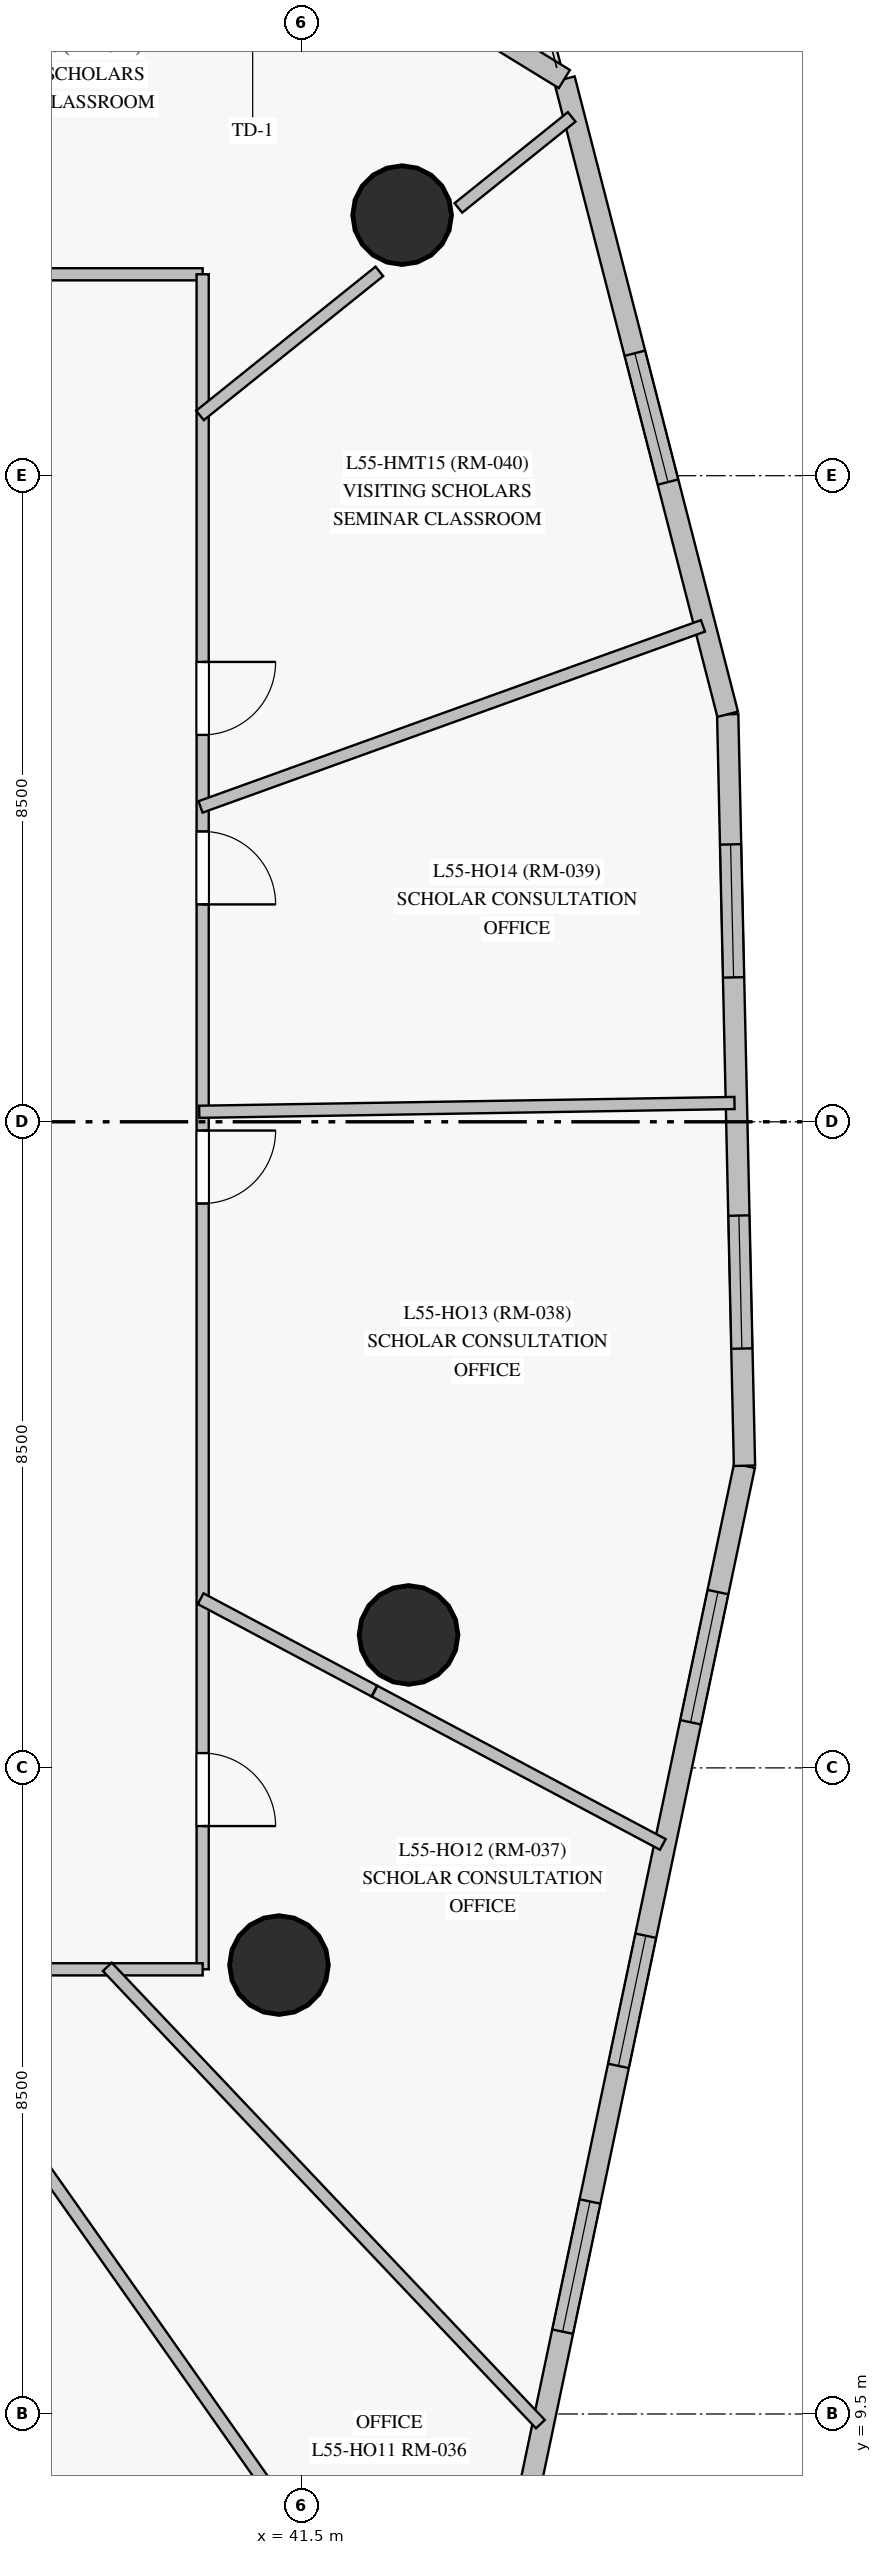
"""IFC4 building model, lengths in metres.
Left out: names, types, materials, properties, quantities, classifications, styles, units other than length and angle.
Written with IfcOpenShell. Run it as: python <this file> out.ifc"""

import sys

from ifc_helpers import new_model, si_unit, direction, frame, frame_2d, origin, origin_with_axes, origin_2d, place, context, subcontext, project, spatial, rectangle, circle, extrude, source, transform, mapped, element, fill, save


model = new_model("IFC4")
c1 = context("Model", 3, precision=1e-05, world=origin(), true_north=direction((0.0, 1.0)))
c2 = subcontext(c1, "Body", "Model", "MODEL_VIEW")
j1 = project(units=[si_unit("LENGTHUNIT", "METRE"), si_unit("PLANEANGLEUNIT", "RADIAN")], contexts=[c1])
p1 = place(None, origin())
s1 = spatial("IfcSite", under=j1, at=p1, CompositionType="ELEMENT")
p2 = place(p1, origin())
s2 = spatial("IfcBuilding", under=s1, at=p2, CompositionType="ELEMENT")
p3 = place(p2, frame((0.0, 0.0, 190.1)))
s3 = spatial("IfcBuildingStorey", under=s2, at=p3, CompositionType="ELEMENT", Elevation=190.1)
m1 = source(origin_with_axes(), c2, "Body", "SweptSolid", [
    extrude(circle(Radius=0.65, at=origin_2d()), origin(), (0.0, 0.0, 1.0), 3.05),
])
for number, where, z_axis, x_axis in (
    (1, (42.909, 19.749, 0.0), (0.0, 0.0, 1.0), (1.0, 0.0, 0.0)),
    (2, (42.824, 38.428, 0.0), (0.0, 0.0, 1.0), (1.0, 0.0, 0.0)),
    (3, (41.204, 15.406, 0.0), (0.0, 0.0, 1.0), (1.0, 0.0, 0.0)),
):
    element("IfcColumn", number, at=place(p3, frame(where, z_axis=z_axis, x_axis=x_axis)), inside=s3, PredefinedType="COLUMN", context=c2, shape_type="MappedRepresentation", body=[
        mapped(m1, transform((0.0, 0.0, 0.0), scale=1.0)),
    ])
p4 = place(p3, frame((44.391, 7.986, 0.0), z_axis=(0.0, 0.0, 1.0), x_axis=(0.205520669539, 0.978652775193, 0.0)))
e4 = element("IfcWall", 4, at=p4, inside=s3, PredefinedType="SOLIDWALL", context=c2, shape_type="SweptSolid", body=[
    extrude(rectangle(XDim=14.294, YDim=0.28, at=frame_2d((7.147, 0.0))), origin(), (0.0, 0.0, 1.0), 2.825),
])
p5 = place(p4, frame((2.654, 0.0, 0.85)))
e5 = element("IfcOpeningElement", 5, at=p5, cuts=e4, PredefinedType="OPENING", context=c2, shape_type="SweptSolid", body=[
    extrude(rectangle(XDim=1.75, YDim=1.65, at=frame_2d((0.875, 0.825))), frame((0.0, 0.15, 0.0), z_axis=(0.0, -1.0, 0.0), x_axis=(1.0, 0.0, 0.0)), (0.0, 0.0, 1.0), 0.3),
])
p6 = place(p4, frame((6.226, 0.0, 0.85)))
e6 = element("IfcOpeningElement", 6, at=p6, cuts=e4, PredefinedType="OPENING", context=c2, shape_type="SweptSolid", body=[
    extrude(rectangle(XDim=1.75, YDim=1.65, at=frame_2d((0.875, 0.825))), frame((0.0, 0.15, 0.0), z_axis=(0.0, -1.0, 0.0), x_axis=(1.0, 0.0, 0.0)), (0.0, 0.0, 1.0), 0.3),
])
p7 = place(p4, frame((10.846, 0.0, 0.85)))
e7 = element("IfcOpeningElement", 7, at=p7, cuts=e4, PredefinedType="OPENING", context=c2, shape_type="SweptSolid", body=[
    extrude(rectangle(XDim=1.75, YDim=1.65, at=frame_2d((0.875, 0.825))), frame((0.0, 0.15, 0.0), z_axis=(0.0, -1.0, 0.0), x_axis=(1.0, 0.0, 0.0)), (0.0, 0.0, 1.0), 0.3),
])
p8 = place(p3, frame((47.328, 21.975, 0.0), z_axis=(0.0, 0.0, 1.0), x_axis=(-0.022343410657, 0.999750354839, 0.0)))
e8 = element("IfcWall", 8, at=p8, inside=s3, PredefinedType="SOLIDWALL", context=c2, shape_type="SweptSolid", body=[
    extrude(rectangle(XDim=9.889, YDim=0.28, at=frame_2d((4.944, 0.0))), origin(), (0.0, 0.0, 1.0), 2.825),
])
p9 = place(p8, frame((1.542, 0.0, 0.85)))
e9 = element("IfcOpeningElement", 9, at=p9, cuts=e8, PredefinedType="OPENING", context=c2, shape_type="SweptSolid", body=[
    extrude(rectangle(XDim=1.75, YDim=1.65, at=frame_2d((0.875, 0.825))), frame((0.0, 0.15, 0.0), z_axis=(0.0, -1.0, 0.0), x_axis=(1.0, 0.0, 0.0)), (0.0, 0.0, 1.0), 0.3),
])
p10 = place(p8, frame((6.427, 0.0, 0.85)))
e10 = element("IfcOpeningElement", 10, at=p10, cuts=e8, PredefinedType="OPENING", context=c2, shape_type="SweptSolid", body=[
    extrude(rectangle(XDim=1.75, YDim=1.65, at=frame_2d((0.875, 0.825))), frame((0.0, 0.15, 0.0), z_axis=(0.0, -1.0, 0.0), x_axis=(1.0, 0.0, 0.0)), (0.0, 0.0, 1.0), 0.3),
])
p11 = place(p3, frame((47.107, 31.861, 0.0), z_axis=(0.0, 0.0, 1.0), x_axis=(-0.249041039811, 0.968492932597, 0.0)))
e11 = element("IfcWall", 11, at=p11, inside=s3, PredefinedType="SOLIDWALL", context=c2, shape_type="SweptSolid", body=[
    extrude(rectangle(XDim=8.629, YDim=0.28, at=frame_2d((4.314, 0.0))), origin(), (0.0, 0.0, 1.0), 2.825),
])
p12 = place(p11, frame((3.154, 0.0, 0.85)))
e12 = element("IfcOpeningElement", 12, at=p12, cuts=e11, PredefinedType="OPENING", context=c2, shape_type="SweptSolid", body=[
    extrude(rectangle(XDim=1.75, YDim=1.65, at=frame_2d((0.875, 0.825))), frame((0.0, 0.15, 0.0), z_axis=(0.0, -1.0, 0.0), x_axis=(1.0, 0.0, 0.0)), (0.0, 0.0, 1.0), 0.3),
])
p13 = place(p3, frame((44.958, 40.218, 0.0), z_axis=(0.0, 0.0, 1.0), x_axis=(-0.852257947878, 0.523121773853, 0.0)))
e13 = element("IfcWall", 13, at=p13, inside=s3, PredefinedType="SOLIDWALL", context=c2, shape_type="SweptSolid", body=[
    extrude(rectangle(XDim=19.246, YDim=0.28, at=frame_2d((9.623, 0.0))), origin(), (0.0, 0.0, 1.0), 2.495),
])
p14 = place(p13, frame((4.287, 0.0, 0.0)))
e14 = element("IfcOpeningElement", 14, at=p14, cuts=e13, PredefinedType="OPENING", context=c2, shape_type="SweptSolid", body=[
    extrude(rectangle(XDim=1.05, YDim=2.12, at=frame_2d((0.525, 1.06))), frame((0.0, 0.15, 0.0), z_axis=(0.0, -1.0, 0.0), x_axis=(1.0, 0.0, 0.0)), (0.0, 0.0, 1.0), 0.3),
])
p15 = place(p3, frame((16.7, 37.65, 0.0), z_axis=(0.0, 0.0, 1.0), x_axis=(1.0, 0.0, 0.0)))
e15 = element("IfcWall", 15, at=p15, inside=s3, PredefinedType="PARTITIONING", context=c2, shape_type="SweptSolid", body=[
    extrude(rectangle(XDim=23.5, YDim=0.16, at=frame_2d((11.75, 0.0))), origin(), (0.0, 0.0, 1.0), 2.375),
])
p16 = place(p15, frame((20.285, 0.0, 0.0)))
e16 = element("IfcOpeningElement", 16, at=p16, cuts=e15, PredefinedType="OPENING", context=c2, shape_type="SweptSolid", body=[
    extrude(rectangle(XDim=0.96, YDim=2.15, at=frame_2d((0.48, 1.075))), frame((0.0, 0.09, 0.0), z_axis=(0.0, -1.0, 0.0), x_axis=(1.0, 0.0, 0.0)), (0.0, 0.0, 1.0), 0.18),
])
p17 = place(p15, frame((16.66, 0.0, 0.0)))
e17 = element("IfcOpeningElement", 17, at=p17, cuts=e15, PredefinedType="OPENING", context=c2, shape_type="SweptSolid", body=[
    extrude(rectangle(XDim=0.96, YDim=2.15, at=frame_2d((0.48, 1.075))), frame((0.0, 0.09, 0.0), z_axis=(0.0, -1.0, 0.0), x_axis=(1.0, 0.0, 0.0)), (0.0, 0.0, 1.0), 0.18),
])
p18 = place(p15, frame((13.863, 0.0, 0.0)))
e18 = element("IfcOpeningElement", 18, at=p18, cuts=e15, PredefinedType="OPENING", context=c2, shape_type="SweptSolid", body=[
    extrude(rectangle(XDim=0.96, YDim=2.15, at=frame_2d((0.48, 1.075))), frame((0.0, 0.09, 0.0), z_axis=(0.0, -1.0, 0.0), x_axis=(1.0, 0.0, 0.0)), (0.0, 0.0, 1.0), 0.18),
])
p19 = place(p15, frame((11.965, 0.0, 0.0)))
e19 = element("IfcOpeningElement", 19, at=p19, cuts=e15, PredefinedType="OPENING", context=c2, shape_type="SweptSolid", body=[
    extrude(rectangle(XDim=0.96, YDim=2.15, at=frame_2d((0.48, 1.075))), frame((0.0, 0.09, 0.0), z_axis=(0.0, -1.0, 0.0), x_axis=(1.0, 0.0, 0.0)), (0.0, 0.0, 1.0), 0.18),
])
p20 = place(p15, frame((10.215, 0.0, 0.0)))
e20 = element("IfcOpeningElement", 20, at=p20, cuts=e15, PredefinedType="OPENING", context=c2, shape_type="SweptSolid", body=[
    extrude(rectangle(XDim=0.96, YDim=2.15, at=frame_2d((0.48, 1.075))), frame((0.0, 0.09, 0.0), z_axis=(0.0, -1.0, 0.0), x_axis=(1.0, 0.0, 0.0)), (0.0, 0.0, 1.0), 0.18),
])
p21 = place(p15, frame((8.14, 0.0, 0.0)))
e21 = element("IfcOpeningElement", 21, at=p21, cuts=e15, PredefinedType="OPENING", context=c2, shape_type="SweptSolid", body=[
    extrude(rectangle(XDim=0.96, YDim=2.15, at=frame_2d((0.48, 1.075))), frame((0.0, 0.09, 0.0), z_axis=(0.0, -1.0, 0.0), x_axis=(1.0, 0.0, 0.0)), (0.0, 0.0, 1.0), 0.18),
])
p22 = place(p15, frame((5.54, 0.0, 0.0)))
e22 = element("IfcOpeningElement", 22, at=p22, cuts=e15, PredefinedType="OPENING", context=c2, shape_type="SweptSolid", body=[
    extrude(rectangle(XDim=0.96, YDim=2.15, at=frame_2d((0.48, 1.075))), frame((0.0, 0.09, 0.0), z_axis=(0.0, -1.0, 0.0), x_axis=(1.0, 0.0, 0.0)), (0.0, 0.0, 1.0), 0.18),
])
p23 = place(p15, frame((3.377, 0.0, 0.0)))
e23 = element("IfcOpeningElement", 23, at=p23, cuts=e15, PredefinedType="OPENING", context=c2, shape_type="SweptSolid", body=[
    extrude(rectangle(XDim=0.96, YDim=2.15, at=frame_2d((0.48, 1.075))), frame((0.0, 0.09, 0.0), z_axis=(0.0, -1.0, 0.0), x_axis=(1.0, 0.0, 0.0)), (0.0, 0.0, 1.0), 0.18),
])
p24 = place(p3, frame((40.2, 37.65, 0.0), z_axis=(0.0, 0.0, 1.0), x_axis=(0.0, -1.0, 0.0)))
e24 = element("IfcWall", 24, at=p24, inside=s3, PredefinedType="PARTITIONING", context=c2, shape_type="SweptSolid", body=[
    extrude(rectangle(XDim=22.3, YDim=0.16, at=frame_2d((11.15, 0.0))), origin(), (0.0, 0.0, 1.0), 2.375),
])
p25 = place(p24, frame((19.455, 0.0, 0.0)))
e25 = element("IfcOpeningElement", 25, at=p25, cuts=e24, PredefinedType="OPENING", context=c2, shape_type="SweptSolid", body=[
    extrude(rectangle(XDim=0.96, YDim=2.15, at=frame_2d((0.48, 1.075))), frame((0.0, 0.09, 0.0), z_axis=(0.0, -1.0, 0.0), x_axis=(1.0, 0.0, 0.0)), (0.0, 0.0, 1.0), 0.18),
])
p26 = place(p24, frame((11.265, 0.0, 0.0)))
e26 = element("IfcOpeningElement", 26, at=p26, cuts=e24, PredefinedType="OPENING", context=c2, shape_type="SweptSolid", body=[
    extrude(rectangle(XDim=0.96, YDim=2.15, at=frame_2d((0.48, 1.075))), frame((0.0, 0.09, 0.0), z_axis=(0.0, -1.0, 0.0), x_axis=(1.0, 0.0, 0.0)), (0.0, 0.0, 1.0), 0.18),
])
p27 = place(p24, frame((7.33, 0.0, 0.0)))
e27 = element("IfcOpeningElement", 27, at=p27, cuts=e24, PredefinedType="OPENING", context=c2, shape_type="SweptSolid", body=[
    extrude(rectangle(XDim=0.96, YDim=2.15, at=frame_2d((0.48, 1.075))), frame((0.0, 0.09, 0.0), z_axis=(0.0, -1.0, 0.0), x_axis=(1.0, 0.0, 0.0)), (0.0, 0.0, 1.0), 0.18),
])
p28 = place(p24, frame((5.1, 0.0, 0.0)))
e28 = element("IfcOpeningElement", 28, at=p28, cuts=e24, PredefinedType="OPENING", context=c2, shape_type="SweptSolid", body=[
    extrude(rectangle(XDim=0.96, YDim=2.15, at=frame_2d((0.48, 1.075))), frame((0.0, 0.09, 0.0), z_axis=(0.0, -1.0, 0.0), x_axis=(1.0, 0.0, 0.0)), (0.0, 0.0, 1.0), 0.18),
])
p29 = place(p3, frame((33.561, 15.377, 0.0), z_axis=(0.0, 0.0, 1.0), x_axis=(0.41866637401, -0.90814011434, 0.0)))
e29 = element("IfcWall", 29, at=p29, inside=s3, PredefinedType="PARTITIONING", context=c2, shape_type="SweptSolid", body=[
    extrude(rectangle(XDim=12.33, YDim=0.16, at=frame_2d((6.165, 0.0))), origin(), (0.0, 0.0, 1.0), 2.825),
])
p30 = place(p3, frame((40.2, 15.35, 0.0), z_axis=(0.0, 0.0, 1.0), x_axis=(-1.0, 0.0, 0.0)))
e30 = element("IfcWall", 30, at=p30, inside=s3, PredefinedType="PARTITIONING", context=c2, shape_type="SweptSolid", body=[
    extrude(rectangle(XDim=10.65, YDim=0.16, at=frame_2d((5.325, 0.0))), origin(), (0.0, 0.0, 1.0), 2.275),
])
p31 = place(p30, frame((8.002, 0.0, 0.0)))
e31 = element("IfcOpeningElement", 31, at=p31, cuts=e30, PredefinedType="OPENING", context=c2, shape_type="SweptSolid", body=[
    extrude(rectangle(XDim=0.96, YDim=2.15, at=frame_2d((0.48, 1.075))), frame((0.0, 0.09, 0.0), z_axis=(0.0, -1.0, 0.0), x_axis=(1.0, 0.0, 0.0)), (0.0, 0.0, 1.0), 0.18),
])
p32 = place(p30, frame((5.258, 0.0, 0.0)))
e32 = element("IfcOpeningElement", 32, at=p32, cuts=e30, PredefinedType="OPENING", context=c2, shape_type="SweptSolid", body=[
    extrude(rectangle(XDim=0.96, YDim=2.15, at=frame_2d((0.48, 1.075))), frame((0.0, 0.09, 0.0), z_axis=(0.0, -1.0, 0.0), x_axis=(1.0, 0.0, 0.0)), (0.0, 0.0, 1.0), 0.18),
])
p33 = place(p30, frame((2.31, 0.0, 0.0)))
e33 = element("IfcOpeningElement", 33, at=p33, cuts=e30, PredefinedType="OPENING", context=c2, shape_type="SweptSolid", body=[
    extrude(rectangle(XDim=0.96, YDim=2.15, at=frame_2d((0.48, 1.075))), frame((0.0, 0.09, 0.0), z_axis=(0.0, -1.0, 0.0), x_axis=(1.0, 0.0, 0.0)), (0.0, 0.0, 1.0), 0.18),
])
p34 = place(p30, frame((4.177, 0.0, 0.0)))
e34 = element("IfcOpeningElement", 34, at=p34, cuts=e30, PredefinedType="OPENING", context=c2, shape_type="SweptSolid", body=[
    extrude(rectangle(XDim=0.86, YDim=2.1, at=frame_2d((0.43, 1.05))), frame((0.0, 0.09, 0.0), z_axis=(0.0, -1.0, 0.0), x_axis=(1.0, 0.0, 0.0)), (0.0, 0.0, 1.0), 0.18),
])
p35 = place(p3, frame((36.244, 15.387, 0.0), z_axis=(0.0, 0.0, 1.0), x_axis=(0.575352301444, -0.817905697023, 0.0)))
e35 = element("IfcWall", 35, at=p35, inside=s3, PredefinedType="PARTITIONING", context=c2, shape_type="SweptSolid", body=[
    extrude(rectangle(XDim=10.672, YDim=0.16, at=frame_2d((5.336, 0.0))), origin(), (0.0, 0.0, 1.0), 2.825),
])
p36 = place(p3, frame((38.946, 15.383, 0.0), z_axis=(0.0, 0.0, 1.0), x_axis=(0.687604884765, -0.726085065572, 0.0)))
e36 = element("IfcWall", 36, at=p36, inside=s3, PredefinedType="PARTITIONING", context=c2, shape_type="SweptSolid", body=[
    extrude(rectangle(XDim=8.286, YDim=0.16, at=frame_2d((4.143, 0.0))), origin(), (0.0, 0.0, 1.0), 2.825),
])
p37 = place(p3, frame((34.583, 37.624, 0.0), z_axis=(0.0, 0.0, 1.0), x_axis=(0.47560743502, 0.879657642355, 0.0)))
e37 = element("IfcWall", 37, at=p37, inside=s3, PredefinedType="PARTITIONING", context=c2, shape_type="SweptSolid", body=[
    extrude(rectangle(XDim=7.625, YDim=0.16, at=frame_2d((3.813, 0.0))), origin(), (0.0, 0.0, 1.0), 2.825),
])
p38 = place(p3, frame((40.155, 26.632, 0.0), z_axis=(0.0, 0.0, 1.0), x_axis=(0.999864992507, 0.016431578076, 0.0)))
e38 = element("IfcWall", 38, at=p38, inside=s3, PredefinedType="PARTITIONING", context=c2, shape_type="SweptSolid", body=[
    extrude(rectangle(XDim=7.043, YDim=0.16, at=frame_2d((3.521, 0.0))), origin(), (0.0, 0.0, 1.0), 2.825),
])
p39 = place(p3, frame((40.172, 30.642, 0.0), z_axis=(0.0, 0.0, 1.0), x_axis=(0.9407806174, 0.339015972964, 0.0)))
e39 = element("IfcWall", 39, at=p39, inside=s3, PredefinedType="PARTITIONING", context=c2, shape_type="SweptSolid", body=[
    extrude(rectangle(XDim=7.026, YDim=0.16, at=frame_2d((3.513, 0.0))), origin(), (0.0, 0.0, 1.0), 2.825),
])
p40 = place(p3, frame((42.462, 19.009, 0.0), z_axis=(0.0, 0.0, 1.0), x_axis=(0.882970667498, -0.469428163128, 0.0)))
e40 = element("IfcWall", 40, at=p40, inside=s3, PredefinedType="PARTITIONING", context=c2, shape_type="SweptSolid", body=[
    extrude(rectangle(XDim=4.294, YDim=0.16, at=frame_2d((2.147, 0.0))), origin(), (0.0, 0.0, 1.0), 2.275),
])
p41 = place(p3, frame((40.165, 35.792, 0.0), z_axis=(0.0, 0.0, 1.0), x_axis=(0.77963972714, 0.626228309696, 0.0)))
e41 = element("IfcWall", 41, at=p41, inside=s3, PredefinedType="PARTITIONING", context=c2, shape_type="SweptSolid", body=[
    extrude(rectangle(XDim=3.027, YDim=0.16, at=frame_2d((1.513, 0.0))), origin(), (0.0, 0.0, 1.0), 2.275),
])
p42 = place(p3, frame((40.174, 20.226, 0.0), z_axis=(0.0, 0.0, 1.0), x_axis=(0.882934818084, -0.469495587855, 0.0)))
e42 = element("IfcWall", 42, at=p42, inside=s3, PredefinedType="PARTITIONING", context=c2, shape_type="SweptSolid", body=[
    extrude(rectangle(XDim=2.587, YDim=0.16, at=frame_2d((1.293, 0.0))), origin(), (0.0, 0.0, 1.0), 2.275),
])
p43 = place(p3, frame((43.564, 38.523, 0.0), z_axis=(0.0, 0.0, 1.0), x_axis=(0.779659188249, 0.626204080295, 0.0)))
e43 = element("IfcWall", 43, at=p43, inside=s3, PredefinedType="PARTITIONING", context=c2, shape_type="SweptSolid", body=[
    extrude(rectangle(XDim=1.912, YDim=0.16, at=frame_2d((0.956, 0.0))), origin(), (0.0, 0.0, 1.0), 2.495),
])
m2 = source(origin_with_axes(), c2, "Body", "SweptSolid", [
    extrude(rectangle(XDim=1.75, YDim=1.65, at=frame_2d((0.875, 0.825))), frame((0.0, 0.03, 0.0), z_axis=(0.0, -1.0, 0.0), x_axis=(1.0, 0.0, 0.0)), (0.0, 0.0, 1.0), 0.06),
])
p44 = place(p5, origin())
e44 = element("IfcWindow", 44, at=p44, inside=s3, PartitioningType="SINGLE_PANEL", PredefinedType="WINDOW", context=c2, shape_type="MappedRepresentation", body=[
    mapped(m2, transform((0.0, 0.0, 0.0), scale=1.0)),
])
fill(e5, e44)
p45 = place(p6, origin())
e45 = element("IfcWindow", 45, at=p45, inside=s3, PartitioningType="SINGLE_PANEL", PredefinedType="WINDOW", context=c2, shape_type="MappedRepresentation", body=[
    mapped(m2, transform((0.0, 0.0, 0.0), scale=1.0)),
])
fill(e6, e45)
p46 = place(p7, origin())
e46 = element("IfcWindow", 46, at=p46, inside=s3, PartitioningType="SINGLE_PANEL", PredefinedType="WINDOW", context=c2, shape_type="MappedRepresentation", body=[
    mapped(m2, transform((0.0, 0.0, 0.0), scale=1.0)),
])
fill(e7, e46)
p47 = place(p9, origin())
e47 = element("IfcWindow", 47, at=p47, inside=s3, PartitioningType="SINGLE_PANEL", PredefinedType="WINDOW", context=c2, shape_type="MappedRepresentation", body=[
    mapped(m2, transform((0.0, 0.0, 0.0), scale=1.0)),
])
fill(e9, e47)
p48 = place(p10, origin())
e48 = element("IfcWindow", 48, at=p48, inside=s3, PartitioningType="SINGLE_PANEL", PredefinedType="WINDOW", context=c2, shape_type="MappedRepresentation", body=[
    mapped(m2, transform((0.0, 0.0, 0.0), scale=1.0)),
])
fill(e10, e48)
p49 = place(p12, origin())
e49 = element("IfcWindow", 49, at=p49, inside=s3, PartitioningType="SINGLE_PANEL", PredefinedType="WINDOW", context=c2, shape_type="MappedRepresentation", body=[
    mapped(m2, transform((0.0, 0.0, 0.0), scale=1.0)),
])
fill(e12, e49)
m3 = source(origin_with_axes(), c2, "Body", "SweptSolid", [
    extrude(rectangle(XDim=0.96, YDim=2.15, at=frame_2d((0.48, 1.075))), frame((0.0, 0.025, 0.0), z_axis=(0.0, -1.0, 0.0), x_axis=(1.0, 0.0, 0.0)), (0.0, 0.0, 1.0), 0.05),
])
p50 = place(p25, origin())
e50 = element("IfcDoor", 50, at=p50, inside=s3, OperationType="SINGLE_SWING_RIGHT", PredefinedType="DOOR", context=c2, shape_type="MappedRepresentation", body=[
    mapped(m3, transform((0.0, 0.0, 0.0), scale=1.0)),
])
fill(e25, e50)
p51 = place(p26, origin())
e51 = element("IfcDoor", 51, at=p51, inside=s3, OperationType="SINGLE_SWING_LEFT", PredefinedType="DOOR", context=c2, shape_type="MappedRepresentation", body=[
    mapped(m3, transform((0.0, 0.0, 0.0), scale=1.0)),
])
fill(e26, e51)
p52 = place(p27, origin())
e52 = element("IfcDoor", 52, at=p52, inside=s3, OperationType="SINGLE_SWING_RIGHT", PredefinedType="DOOR", context=c2, shape_type="MappedRepresentation", body=[
    mapped(m3, transform((0.0, 0.0, 0.0), scale=1.0)),
])
fill(e27, e52)
p53 = place(p28, origin())
e53 = element("IfcDoor", 53, at=p53, inside=s3, OperationType="SINGLE_SWING_LEFT", PredefinedType="DOOR", context=c2, shape_type="MappedRepresentation", body=[
    mapped(m3, transform((0.0, 0.0, 0.0), scale=1.0)),
])
fill(e28, e53)
save(model, sys.argv[1])
